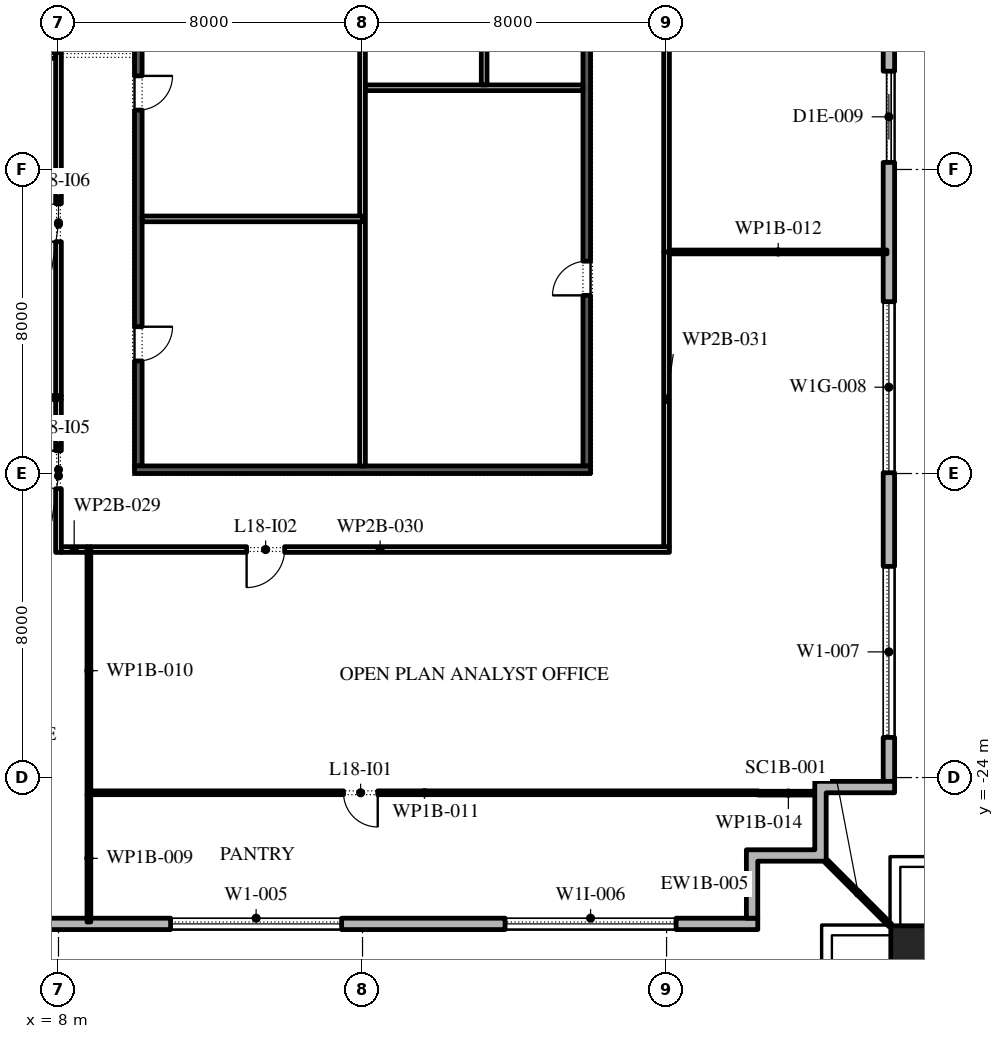
"""IFC4 building model, lengths in metres.
Left out: names, types, materials, properties, quantities, classifications, styles, units other than length and angle.
Written with IfcOpenShell. Run it as: python <this file> out.ifc"""

import sys

from ifc_helpers import new_model, si_unit, direction, frame, frame_2d, origin, origin_2d, place, context, subcontext, project, spatial, polyline, rectangle, outline, extrude, element, fill, save


model = new_model("IFC4")
c1 = context("Model", 3, precision=1e-05, world=origin(), true_north=direction((0.0, 1.0)))
c2 = subcontext(c1, "Body", "Model", "MODEL_VIEW")
j1 = project(units=[si_unit("LENGTHUNIT", "METRE"), si_unit("PLANEANGLEUNIT", "RADIAN")], contexts=[c1])
p1 = place(None, origin())
s1 = spatial("IfcSite", under=j1, at=p1, CompositionType="ELEMENT")
p2 = place(p1, origin())
s2 = spatial("IfcBuilding", under=s1, at=p2, CompositionType="ELEMENT")
p3 = place(p2, frame((0.0, 0.0, 85.8)))
s3 = spatial("IfcBuildingStorey", under=s2, at=p3, CompositionType="ELEMENT", Elevation=85.8)
p4 = place(p3, frame((30.6, -28.6, 0.0), z_axis=(0.0, 0.0, 1.0), x_axis=(1.0, 0.0, 0.0)))
e1 = element("IfcColumn", 1, at=p4, inside=s3, PredefinedType="COLUMN", context=c2, shape_type="SweptSolid", body=[
    extrude(rectangle(XDim=1.4, YDim=1.4, at=origin_2d()), origin(), (0.0, 0.0, 1.0), 4.2),
])
p5 = place(p3, frame((-26.1, -27.85, 0.0), z_axis=(0.0, 0.0, 1.0), x_axis=(1.0, 0.0, 0.0)))
e2 = element("IfcWall", 2, at=p5, inside=s3, PredefinedType="STANDARD", context=c2, shape_type="SweptSolid", body=[
    extrude(rectangle(XDim=52.5, YDim=0.3, at=frame_2d((26.25, 0.0))), origin(), (0.0, 0.0, 1.0), 3.95),
])
p6 = place(p5, frame((2.0, 0.0, 0.45)))
e3 = element("IfcOpeningElement", 3, at=p6, cuts=e2, PredefinedType="OPENING", context=c2, shape_type="SweptSolid", body=[
    extrude(rectangle(XDim=4.5, YDim=2.7, at=frame_2d((2.25, 1.35))), frame((0.0, 0.16, 0.0), z_axis=(0.0, -1.0, 0.0), x_axis=(1.0, 0.0, 0.0)), (0.0, 0.0, 1.0), 0.32),
])
p7 = place(p5, frame((10.65, 0.0, 0.45)))
e4 = element("IfcOpeningElement", 4, at=p7, cuts=e2, PredefinedType="OPENING", context=c2, shape_type="SweptSolid", body=[
    extrude(rectangle(XDim=4.5, YDim=3.05, at=frame_2d((2.25, 1.525))), frame((0.0, 0.16, 0.0), z_axis=(0.0, -1.0, 0.0), x_axis=(1.0, 0.0, 0.0)), (0.0, 0.0, 1.0), 0.32),
])
p8 = place(p5, frame((20.5, 0.0, 0.0)))
e5 = element("IfcOpeningElement", 5, at=p8, cuts=e2, PredefinedType="OPENING", context=c2, shape_type="SweptSolid", body=[
    extrude(rectangle(XDim=2.4, YDim=3.15, at=frame_2d((1.2, 1.575))), frame((0.0, 0.16, 0.0), z_axis=(0.0, -1.0, 0.0), x_axis=(1.0, 0.0, 0.0)), (0.0, 0.0, 1.0), 0.32),
])
p9 = place(p5, frame((28.25, 0.0, 0.45)))
e6 = element("IfcOpeningElement", 6, at=p9, cuts=e2, PredefinedType="OPENING", context=c2, shape_type="SweptSolid", body=[
    extrude(rectangle(XDim=4.5, YDim=2.7, at=frame_2d((2.25, 1.35))), frame((0.0, 0.16, 0.0), z_axis=(0.0, -1.0, 0.0), x_axis=(1.0, 0.0, 0.0)), (0.0, 0.0, 1.0), 0.32),
])
p10 = place(p5, frame((37.05, 0.0, 0.45)))
e7 = element("IfcOpeningElement", 7, at=p10, cuts=e2, PredefinedType="OPENING", context=c2, shape_type="SweptSolid", body=[
    extrude(rectangle(XDim=4.5, YDim=3.05, at=frame_2d((2.25, 1.525))), frame((0.0, 0.16, 0.0), z_axis=(0.0, -1.0, 0.0), x_axis=(1.0, 0.0, 0.0)), (0.0, 0.0, 1.0), 0.32),
])
p11 = place(p5, frame((45.85, 0.0, 0.45)))
e8 = element("IfcOpeningElement", 8, at=p11, cuts=e2, PredefinedType="OPENING", context=c2, shape_type="SweptSolid", body=[
    extrude(rectangle(XDim=4.5, YDim=2.7, at=frame_2d((2.25, 1.35))), frame((0.0, 0.16, 0.0), z_axis=(0.0, -1.0, 0.0), x_axis=(1.0, 0.0, 0.0)), (0.0, 0.0, 1.0), 0.32),
])
p12 = place(p3, frame((29.85, -24.1, 0.0), z_axis=(0.0, 0.0, 1.0), x_axis=(0.0, 1.0, 0.0)))
e9 = element("IfcWall", 9, at=p12, inside=s3, PredefinedType="STANDARD", context=c2, shape_type="SweptSolid", body=[
    extrude(rectangle(XDim=49.5, YDim=0.3, at=frame_2d((24.75, 0.0))), origin(), (0.0, 0.0, 1.0), 3.95),
])
p13 = place(p12, frame((1.157, 0.0, 0.45)))
e10 = element("IfcOpeningElement", 10, at=p13, cuts=e9, PredefinedType="OPENING", context=c2, shape_type="SweptSolid", body=[
    extrude(rectangle(XDim=4.5, YDim=3.05, at=frame_2d((2.25, 1.525))), frame((0.0, 0.16, 0.0), z_axis=(0.0, -1.0, 0.0), x_axis=(1.0, 0.0, 0.0)), (0.0, 0.0, 1.0), 0.32),
])
p14 = place(p12, frame((8.121, 0.0, 0.45)))
e11 = element("IfcOpeningElement", 11, at=p14, cuts=e9, PredefinedType="OPENING", context=c2, shape_type="SweptSolid", body=[
    extrude(rectangle(XDim=4.5, YDim=2.775, at=frame_2d((2.25, 1.387))), frame((0.0, 0.16, 0.0), z_axis=(0.0, -1.0, 0.0), x_axis=(1.0, 0.0, 0.0)), (0.0, 0.0, 1.0), 0.32),
])
p15 = place(p12, frame((16.286, 0.0, 0.0)))
e12 = element("IfcOpeningElement", 12, at=p15, cuts=e9, PredefinedType="OPENING", context=c2, shape_type="SweptSolid", body=[
    extrude(rectangle(XDim=2.4, YDim=3.275, at=frame_2d((1.2, 1.637))), frame((0.0, 0.16, 0.0), z_axis=(0.0, -1.0, 0.0), x_axis=(1.0, 0.0, 0.0)), (0.0, 0.0, 1.0), 0.32),
])
p16 = place(p12, frame((22.35, 0.0, 0.45)))
e13 = element("IfcOpeningElement", 13, at=p16, cuts=e9, PredefinedType="OPENING", context=c2, shape_type="SweptSolid", body=[
    extrude(rectangle(XDim=4.5, YDim=2.825, at=frame_2d((2.25, 1.413))), frame((0.0, 0.16, 0.0), z_axis=(0.0, -1.0, 0.0), x_axis=(1.0, 0.0, 0.0)), (0.0, 0.0, 1.0), 0.32),
])
p17 = place(p12, frame((29.464, 0.0, 0.45)))
e14 = element("IfcOpeningElement", 14, at=p17, cuts=e9, PredefinedType="OPENING", context=c2, shape_type="SweptSolid", body=[
    extrude(rectangle(XDim=4.5, YDim=2.825, at=frame_2d((2.25, 1.413))), frame((0.0, 0.16, 0.0), z_axis=(0.0, -1.0, 0.0), x_axis=(1.0, 0.0, 0.0)), (0.0, 0.0, 1.0), 0.32),
])
p18 = place(p12, frame((36.579, 0.0, 0.45)))
e15 = element("IfcOpeningElement", 15, at=p18, cuts=e9, PredefinedType="OPENING", context=c2, shape_type="SweptSolid", body=[
    extrude(rectangle(XDim=4.5, YDim=3.05, at=frame_2d((2.25, 1.525))), frame((0.0, 0.16, 0.0), z_axis=(0.0, -1.0, 0.0), x_axis=(1.0, 0.0, 0.0)), (0.0, 0.0, 1.0), 0.32),
])
p19 = place(p12, frame((44.743, 0.0, 0.0)))
e16 = element("IfcOpeningElement", 16, at=p19, cuts=e9, PredefinedType="OPENING", context=c2, shape_type="SweptSolid", body=[
    extrude(rectangle(XDim=2.4, YDim=3.275, at=frame_2d((1.2, 1.637))), frame((0.0, 0.16, 0.0), z_axis=(0.0, -1.0, 0.0), x_axis=(1.0, 0.0, 0.0)), (0.0, 0.0, 1.0), 0.32),
])
p20 = place(p3, origin())
e17 = element("IfcWall", 17, at=p20, inside=s3, PredefinedType="STANDARD", context=c2, shape_type="SweptSolid", body=[
    extrude(outline(polyline([(27.9, -25.9), (27.9, -24.1), (30.0, -24.1), (30.0, -24.4), (28.2, -24.4), (28.2, -26.2), (26.4, -26.2), (26.4, -27.7), (26.1, -27.7), (26.1, -25.9), (27.9, -25.9)])), origin(), (0.0, 0.0, 1.0), 3.95),
])
p21 = place(p3, frame((28.2, -26.2, -0.05), z_axis=(0.0, 0.0, 1.0), x_axis=(0.707106781187, -0.707106781187, 0.0)))
e18 = element("IfcWall", 18, at=p21, inside=s3, PredefinedType="STANDARD", context=c2, shape_type="SweptSolid", body=[
    extrude(rectangle(XDim=2.385, YDim=0.1, at=frame_2d((1.192, 0.0))), origin(), (0.0, 0.0, 1.0), 4.0),
])
p22 = place(p3, frame((21.9, -15.8, 0.0), z_axis=(0.0, 0.0, 1.0), x_axis=(0.0, 1.0, 0.0)))
e19 = element("IfcWall", 19, at=p22, inside=s3, PredefinedType="SHEAR", context=c2, shape_type="SweptSolid", body=[
    extrude(rectangle(XDim=13.05, YDim=0.2, at=frame_2d((6.525, 0.0))), origin(), (0.0, 0.0, 1.0), 3.95),
])
p23 = place(p22, frame((4.488, 0.0, 0.0)))
e20 = element("IfcOpeningElement", 20, at=p23, cuts=e19, PredefinedType="OPENING", context=c2, shape_type="SweptSolid", body=[
    extrude(rectangle(XDim=0.9, YDim=2.1, at=frame_2d((0.45, 1.05))), frame((0.0, 0.11, 0.0), z_axis=(0.0, -1.0, 0.0), x_axis=(1.0, 0.0, 0.0)), (0.0, 0.0, 1.0), 0.22),
])
p24 = place(p22, frame((11.038, 0.0, 0.0)))
e21 = element("IfcOpeningElement", 21, at=p24, cuts=e19, PredefinedType="OPENING", context=c2, shape_type="SweptSolid", body=[
    extrude(rectangle(XDim=1.0, YDim=2.1, at=frame_2d((0.5, 1.05))), frame((0.0, 0.11, 0.0), z_axis=(0.0, -1.0, 0.0), x_axis=(1.0, 0.0, 0.0)), (0.0, 0.0, 1.0), 0.22),
])
p25 = place(p3, frame((10.1, -15.8, 0.0), z_axis=(0.0, 0.0, 1.0), x_axis=(0.0, 1.0, 0.0)))
e22 = element("IfcWall", 22, at=p25, inside=s3, PredefinedType="SHEAR", context=c2, shape_type="SweptSolid", body=[
    extrude(rectangle(XDim=13.05, YDim=0.2, at=frame_2d((6.525, 0.0))), origin(), (0.0, 0.0, 1.0), 3.95),
])
p26 = place(p25, frame((2.762, 0.0, 0.0)))
e23 = element("IfcOpeningElement", 23, at=p26, cuts=e22, PredefinedType="OPENING", context=c2, shape_type="SweptSolid", body=[
    extrude(rectangle(XDim=0.9, YDim=2.1, at=frame_2d((0.45, 1.05))), frame((0.0, 0.11, 0.0), z_axis=(0.0, -1.0, 0.0), x_axis=(1.0, 0.0, 0.0)), (0.0, 0.0, 1.0), 0.22),
])
p27 = place(p25, frame((9.363, 0.0, 0.0)))
e24 = element("IfcOpeningElement", 24, at=p27, cuts=e22, PredefinedType="OPENING", context=c2, shape_type="SweptSolid", body=[
    extrude(rectangle(XDim=0.9, YDim=2.1, at=frame_2d((0.45, 1.05))), frame((0.0, 0.11, 0.0), z_axis=(0.0, -1.0, 0.0), x_axis=(1.0, 0.0, 0.0)), (0.0, 0.0, 1.0), 0.22),
])
p28 = place(p3, frame((10.0, -15.9, 0.0), z_axis=(0.0, 0.0, 1.0), x_axis=(1.0, 0.0, 0.0)))
e25 = element("IfcWall", 25, at=p28, inside=s3, PredefinedType="SHEAR", context=c2, shape_type="SweptSolid", body=[
    extrude(rectangle(XDim=12.0, YDim=0.2, at=frame_2d((6.0, 0.0))), origin(), (0.0, 0.0, 1.0), 3.95),
])
p29 = place(p3, frame((16.0, -15.8, 0.0), z_axis=(0.0, 0.0, 1.0), x_axis=(0.0, 1.0, 0.0)))
e26 = element("IfcWall", 26, at=p29, inside=s3, PredefinedType="PARTITIONING", context=c2, shape_type="SweptSolid", body=[
    extrude(rectangle(XDim=13.05, YDim=0.15, at=frame_2d((6.525, 0.0))), origin(), (0.0, 0.0, 1.0), 3.95),
])
p30 = place(p29, frame((11.087, 0.0, 0.0)))
e27 = element("IfcOpeningElement", 27, at=p30, cuts=e26, PredefinedType="OPENING", context=c2, shape_type="SweptSolid", body=[
    extrude(rectangle(XDim=0.9, YDim=2.1, at=frame_2d((0.45, 1.05))), frame((0.0, 0.085, 0.0), z_axis=(0.0, -1.0, 0.0), x_axis=(1.0, 0.0, 0.0)), (0.0, 0.0, 1.0), 0.17),
])
p31 = place(p3, frame((10.2, -9.3, 0.0), z_axis=(0.0, 0.0, 1.0), x_axis=(1.0, 0.0, 0.0)))
e28 = element("IfcWall", 28, at=p31, inside=s3, PredefinedType="PARTITIONING", context=c2, shape_type="SweptSolid", body=[
    extrude(rectangle(XDim=5.8, YDim=0.15, at=frame_2d((2.9, 0.0))), origin(), (0.0, 0.0, 1.0), 3.95),
])
p32 = place(p3, frame((16.075, -5.85, 0.0), z_axis=(0.0, 0.0, 1.0), x_axis=(1.0, 0.0, 0.0)))
e29 = element("IfcWall", 29, at=p32, inside=s3, PredefinedType="PARTITIONING", context=c2, shape_type="SweptSolid", body=[
    extrude(rectangle(XDim=5.725, YDim=0.15, at=frame_2d((2.863, 0.0))), origin(), (0.0, 0.0, 1.0), 3.95),
])
p33 = place(p3, frame((19.2, -5.775, 0.0), z_axis=(0.0, 0.0, 1.0), x_axis=(0.0, 1.0, 0.0)))
e30 = element("IfcWall", 30, at=p33, inside=s3, PredefinedType="PARTITIONING", context=c2, shape_type="SweptSolid", body=[
    extrude(rectangle(XDim=3.025, YDim=0.15, at=frame_2d((1.512, 0.0))), origin(), (0.0, 0.0, 1.0), 3.95),
])
p34 = place(p3, frame((0.05, -14.0, 0.0), z_axis=(0.0, 0.0, 1.0), x_axis=(1.0, 0.0, 0.0)))
e31 = element("IfcWall", 31, at=p34, inside=s3, PredefinedType="PARTITIONING", context=c2, shape_type="SweptSolid", body=[
    extrude(rectangle(XDim=8.025, YDim=0.1, at=frame_2d((4.012, 0.0))), origin(), (0.0, 0.0, 1.0), 3.95),
])
p35 = place(p3, frame((8.0, -18.075, 0.0), z_axis=(0.0, 0.0, 1.0), x_axis=(0.0, 1.0, 0.0)))
e32 = element("IfcWall", 32, at=p35, inside=s3, PredefinedType="PARTITIONING", context=c2, shape_type="SweptSolid", body=[
    extrude(rectangle(XDim=4.025, YDim=0.15, at=frame_2d((2.012, 0.0))), origin(), (0.0, 0.0, 1.0), 3.95),
])
p36 = place(p35, frame((1.675, 0.0, 0.0)))
e33 = element("IfcOpeningElement", 33, at=p36, cuts=e32, PredefinedType="OPENING", context=c2, shape_type="SweptSolid", body=[
    extrude(rectangle(XDim=1.0, YDim=2.1, at=frame_2d((0.5, 1.05))), frame((0.0, 0.085, 0.0), z_axis=(0.0, -1.0, 0.0), x_axis=(1.0, 0.0, 0.0)), (0.0, 0.0, 1.0), 0.17),
])
p37 = place(p3, frame((8.0, -13.95, 0.0), z_axis=(0.0, 0.0, 1.0), x_axis=(0.0, 1.0, 0.0)))
e34 = element("IfcWall", 34, at=p37, inside=s3, PredefinedType="PARTITIONING", context=c2, shape_type="SweptSolid", body=[
    extrude(rectangle(XDim=9.025, YDim=0.15, at=frame_2d((4.512, 0.0))), origin(), (0.0, 0.0, 1.0), 3.95),
])
p38 = place(p37, frame((4.05, 0.0, 0.0)))
e35 = element("IfcOpeningElement", 35, at=p38, cuts=e34, PredefinedType="OPENING", context=c2, shape_type="SweptSolid", body=[
    extrude(rectangle(XDim=1.0, YDim=2.1, at=frame_2d((0.5, 1.05))), frame((0.0, 0.085, 0.0), z_axis=(0.0, -1.0, 0.0), x_axis=(1.0, 0.0, 0.0)), (0.0, 0.0, 1.0), 0.17),
])
p39 = place(p3, frame((7.925, -5.0, 0.0), z_axis=(0.0, 0.0, 1.0), x_axis=(-1.0, 0.0, 0.0)))
e36 = element("IfcWall", 36, at=p39, inside=s3, PredefinedType="PARTITIONING", context=c2, shape_type="SweptSolid", body=[
    extrude(rectangle(XDim=7.875, YDim=0.15, at=frame_2d((3.938, 0.0))), origin(), (0.0, 0.0, 1.0), 3.95),
])
p40 = place(p3, frame((8.8, -27.8, 0.0), z_axis=(0.0, 0.0, 1.0), x_axis=(0.0, 1.0, 0.0)))
e37 = element("IfcWall", 37, at=p40, inside=s3, PredefinedType="PARTITIONING", context=c2, shape_type="SweptSolid", body=[
    extrude(rectangle(XDim=3.35, YDim=0.1, at=frame_2d((1.675, 0.0))), origin(), (0.0, 0.0, 1.0), 3.95),
])
p41 = place(p3, frame((8.8, -24.45, 0.0), z_axis=(0.0, 0.0, 1.0), x_axis=(0.0, 1.0, 0.0)))
e38 = element("IfcWall", 38, at=p41, inside=s3, PredefinedType="PARTITIONING", context=c2, shape_type="SweptSolid", body=[
    extrude(rectangle(XDim=6.525, YDim=0.1, at=frame_2d((3.262, 0.0))), origin(), (0.0, 0.0, 1.0), 3.95),
])
p42 = place(p3, frame((8.85, -24.4, 0.0), z_axis=(0.0, 0.0, 1.0), x_axis=(1.0, 0.0, 0.0)))
e39 = element("IfcWall", 39, at=p42, inside=s3, PredefinedType="PARTITIONING", context=c2, shape_type="SweptSolid", body=[
    extrude(rectangle(XDim=17.56, YDim=0.1, at=frame_2d((8.78, 0.0))), origin(), (0.0, 0.0, 1.0), 3.95),
])
p43 = place(p42, frame((6.65, 0.0, 0.0)))
e40 = element("IfcOpeningElement", 40, at=p43, cuts=e39, PredefinedType="OPENING", context=c2, shape_type="SweptSolid", body=[
    extrude(rectangle(XDim=0.9, YDim=2.1, at=frame_2d((0.45, 1.05))), frame((0.0, 0.06, 0.0), z_axis=(0.0, -1.0, 0.0), x_axis=(1.0, 0.0, 0.0)), (0.0, 0.0, 1.0), 0.12),
])
p44 = place(p3, frame((8.75, -18.0, 0.0), z_axis=(0.0, 0.0, 1.0), x_axis=(-1.0, 0.0, 0.0)))
e41 = element("IfcWall", 41, at=p44, inside=s3, PredefinedType="PARTITIONING", context=c2, shape_type="SweptSolid", body=[
    extrude(rectangle(XDim=0.675, YDim=0.15, at=frame_2d((0.337, 0.0))), origin(), (0.0, 0.0, 1.0), 3.95),
])
p45 = place(p3, frame((24.075, -18.0, 0.0), z_axis=(0.0, 0.0, 1.0), x_axis=(-1.0, 0.0, 0.0)))
e42 = element("IfcWall", 42, at=p45, inside=s3, PredefinedType="PARTITIONING", context=c2, shape_type="SweptSolid", body=[
    extrude(rectangle(XDim=15.225, YDim=0.15, at=frame_2d((7.612, 0.0))), origin(), (0.0, 0.0, 1.0), 3.95),
])
p46 = place(p45, frame((10.125, 0.0, 0.0)))
e43 = element("IfcOpeningElement", 43, at=p46, cuts=e42, PredefinedType="OPENING", context=c2, shape_type="SweptSolid", body=[
    extrude(rectangle(XDim=1.0, YDim=2.1, at=frame_2d((0.5, 1.05))), frame((0.0, 0.085, 0.0), z_axis=(0.0, -1.0, 0.0), x_axis=(1.0, 0.0, 0.0)), (0.0, 0.0, 1.0), 0.17),
])
p47 = place(p3, frame((24.0, -10.17, 0.0), z_axis=(0.0, 0.0, 1.0), x_axis=(0.0, -1.0, 0.0)))
e44 = element("IfcWall", 44, at=p47, inside=s3, PredefinedType="PARTITIONING", context=c2, shape_type="SweptSolid", body=[
    extrude(rectangle(XDim=7.755, YDim=0.15, at=frame_2d((3.877, 0.0))), origin(), (0.0, 0.0, 1.0), 3.95),
])
p48 = place(p3, frame((24.075, -10.17, 0.0), z_axis=(0.0, 0.0, 1.0), x_axis=(1.0, 0.0, 0.0)))
e45 = element("IfcWall", 45, at=p48, inside=s3, PredefinedType="PARTITIONING", context=c2, shape_type="SweptSolid", body=[
    extrude(rectangle(XDim=5.725, YDim=0.1, at=frame_2d((2.863, 0.0))), origin(), (0.0, 0.0, 1.0), 3.95),
])
p49 = place(p3, frame((24.0, 11.22, 0.0), z_axis=(0.0, 0.0, 1.0), x_axis=(0.0, -1.0, 0.0)))
e46 = element("IfcWall", 46, at=p49, inside=s3, PredefinedType="PARTITIONING", context=c2, shape_type="SweptSolid", body=[
    extrude(rectangle(XDim=21.39, YDim=0.15, at=frame_2d((10.695, 0.0))), origin(), (0.0, 0.0, 1.0), 3.95),
])
p50 = place(p49, frame((14.49, 0.0, 0.0)))
e47 = element("IfcOpeningElement", 47, at=p50, cuts=e46, PredefinedType="OPENING", context=c2, shape_type="SweptSolid", body=[
    extrude(rectangle(XDim=1.0, YDim=2.1, at=frame_2d((0.5, 1.05))), frame((0.0, 0.085, 0.0), z_axis=(0.0, -1.0, 0.0), x_axis=(1.0, 0.0, 0.0)), (0.0, 0.0, 1.0), 0.17),
])
p51 = place(p3, frame((26.41, -24.41, 0.0), z_axis=(0.0, 0.0, 1.0), x_axis=(1.0, 0.0, 0.0)))
e48 = element("IfcWall", 48, at=p51, inside=s3, PredefinedType="PARTITIONING", context=c2, shape_type="SweptSolid", body=[
    extrude(rectangle(XDim=1.59, YDim=0.1, at=frame_2d((0.795, 0.0))), origin(), (0.0, 0.0, 1.0), 3.95),
])
p52 = place(p10, origin())
e49 = element("IfcWindow", 49, at=p52, inside=s3, PartitioningType="DOUBLE_PANEL_VERTICAL", PredefinedType="WINDOW", context=c2, shape_type="SweptSolid", body=[
    extrude(rectangle(XDim=4.5, YDim=3.05, at=frame_2d((2.25, 1.525))), frame((0.0, 0.03, 0.0), z_axis=(0.0, -1.0, 0.0), x_axis=(1.0, 0.0, 0.0)), (0.0, 0.0, 1.0), 0.06),
])
fill(e7, e49)
p53 = place(p11, origin())
e50 = element("IfcWindow", 50, at=p53, inside=s3, PartitioningType="DOUBLE_PANEL_VERTICAL", PredefinedType="WINDOW", context=c2, shape_type="SweptSolid", body=[
    extrude(rectangle(XDim=4.5, YDim=2.7, at=frame_2d((2.25, 1.35))), frame((0.0, 0.03, 0.0), z_axis=(0.0, -1.0, 0.0), x_axis=(1.0, 0.0, 0.0)), (0.0, 0.0, 1.0), 0.06),
])
fill(e8, e50)
p54 = place(p13, origin())
e51 = element("IfcWindow", 51, at=p54, inside=s3, PartitioningType="DOUBLE_PANEL_VERTICAL", PredefinedType="WINDOW", context=c2, shape_type="SweptSolid", body=[
    extrude(rectangle(XDim=4.5, YDim=3.05, at=frame_2d((2.25, 1.525))), frame((0.0, 0.03, 0.0), z_axis=(0.0, -1.0, 0.0), x_axis=(1.0, 0.0, 0.0)), (0.0, 0.0, 1.0), 0.06),
])
fill(e10, e51)
p55 = place(p14, origin())
e52 = element("IfcWindow", 52, at=p55, inside=s3, PartitioningType="DOUBLE_PANEL_VERTICAL", PredefinedType="WINDOW", context=c2, shape_type="SweptSolid", body=[
    extrude(rectangle(XDim=4.5, YDim=2.775, at=frame_2d((2.25, 1.387))), frame((0.0, 0.03, 0.0), z_axis=(0.0, -1.0, 0.0), x_axis=(1.0, 0.0, 0.0)), (0.0, 0.0, 1.0), 0.06),
])
fill(e11, e52)
p56 = place(p15, origin())
e53 = element("IfcDoor", 53, at=p56, inside=s3, OperationType="DOUBLE_DOOR_SLIDING", PredefinedType="DOOR", context=c2, shape_type="SweptSolid", body=[
    extrude(rectangle(XDim=2.4, YDim=3.275, at=frame_2d((1.2, 1.637))), frame((0.0, 0.025, 0.0), z_axis=(0.0, -1.0, 0.0), x_axis=(1.0, 0.0, 0.0)), (0.0, 0.0, 1.0), 0.05),
])
fill(e12, e53)
p57 = place(p23, origin())
e54 = element("IfcDoor", 54, at=p57, inside=s3, OperationType="SINGLE_SWING_RIGHT", PredefinedType="DOOR", context=c2, shape_type="SweptSolid", body=[
    extrude(rectangle(XDim=0.9, YDim=2.1, at=frame_2d((0.45, 1.05))), frame((0.0, 0.1, 0.0), z_axis=(0.0, -1.0, 0.0), x_axis=(1.0, 0.0, 0.0)), (0.0, 0.0, 1.0), 0.05),
])
fill(e20, e54)
p58 = place(p26, frame((0.9, -0.15, 0.0), z_axis=(0.0, 0.0, 1.0), x_axis=(-1.0, 0.0, 0.0)))
e55 = element("IfcDoor", 55, at=p58, inside=s3, OperationType="SINGLE_SWING_RIGHT", PredefinedType="DOOR", context=c2, shape_type="SweptSolid", body=[
    extrude(rectangle(XDim=0.9, YDim=2.1, at=frame_2d((0.45, 1.05))), frame((0.0, -0.05, 0.0), z_axis=(0.0, -1.0, 0.0), x_axis=(1.0, 0.0, 0.0)), (0.0, 0.0, 1.0), 0.05),
])
fill(e23, e55)
p59 = place(p27, frame((0.9, -0.15, 0.0), z_axis=(0.0, 0.0, 1.0), x_axis=(-1.0, 0.0, 0.0)))
e56 = element("IfcDoor", 56, at=p59, inside=s3, OperationType="SINGLE_SWING_RIGHT", PredefinedType="DOOR", context=c2, shape_type="SweptSolid", body=[
    extrude(rectangle(XDim=0.9, YDim=2.1, at=frame_2d((0.45, 1.05))), frame((0.0, -0.05, 0.0), z_axis=(0.0, -1.0, 0.0), x_axis=(1.0, 0.0, 0.0)), (0.0, 0.0, 1.0), 0.05),
])
fill(e24, e56)
p60 = place(p43, frame((0.9, 0.0, 0.0), z_axis=(0.0, 0.0, 1.0), x_axis=(-1.0, 0.0, 0.0)))
e57 = element("IfcDoor", 57, at=p60, inside=s3, OperationType="SINGLE_SWING_RIGHT", PredefinedType="DOOR", context=c2, shape_type="SweptSolid", body=[
    extrude(rectangle(XDim=0.9, YDim=2.1, at=frame_2d((0.45, 1.05))), frame((0.0, 0.025, 0.0), z_axis=(0.0, -1.0, 0.0), x_axis=(1.0, 0.0, 0.0)), (0.0, 0.0, 1.0), 0.05),
])
fill(e40, e57)
p61 = place(p46, origin())
e58 = element("IfcDoor", 58, at=p61, inside=s3, OperationType="SINGLE_SWING_LEFT", PredefinedType="DOOR", context=c2, shape_type="SweptSolid", body=[
    extrude(rectangle(XDim=1.0, YDim=2.1, at=frame_2d((0.5, 1.05))), frame((0.0, 0.025, 0.0), z_axis=(0.0, -1.0, 0.0), x_axis=(1.0, 0.0, 0.0)), (0.0, 0.0, 1.0), 0.05),
])
fill(e43, e58)
p62 = place(p36, origin())
e59 = element("IfcDoor", 59, at=p62, inside=s3, OperationType="SINGLE_SWING_LEFT", PredefinedType="DOOR", context=c2, shape_type="SweptSolid", body=[
    extrude(rectangle(XDim=1.0, YDim=2.1, at=frame_2d((0.5, 1.05))), frame((0.0, 0.025, 0.0), z_axis=(0.0, -1.0, 0.0), x_axis=(1.0, 0.0, 0.0)), (0.0, 0.0, 1.0), 0.05),
])
fill(e33, e59)
p63 = place(p38, origin())
e60 = element("IfcDoor", 60, at=p63, inside=s3, OperationType="SINGLE_SWING_RIGHT", PredefinedType="DOOR", context=c2, shape_type="SweptSolid", body=[
    extrude(rectangle(XDim=1.0, YDim=2.1, at=frame_2d((0.5, 1.05))), frame((0.0, 0.025, 0.0), z_axis=(0.0, -1.0, 0.0), x_axis=(1.0, 0.0, 0.0)), (0.0, 0.0, 1.0), 0.05),
])
fill(e35, e60)
save(model, sys.argv[1])
